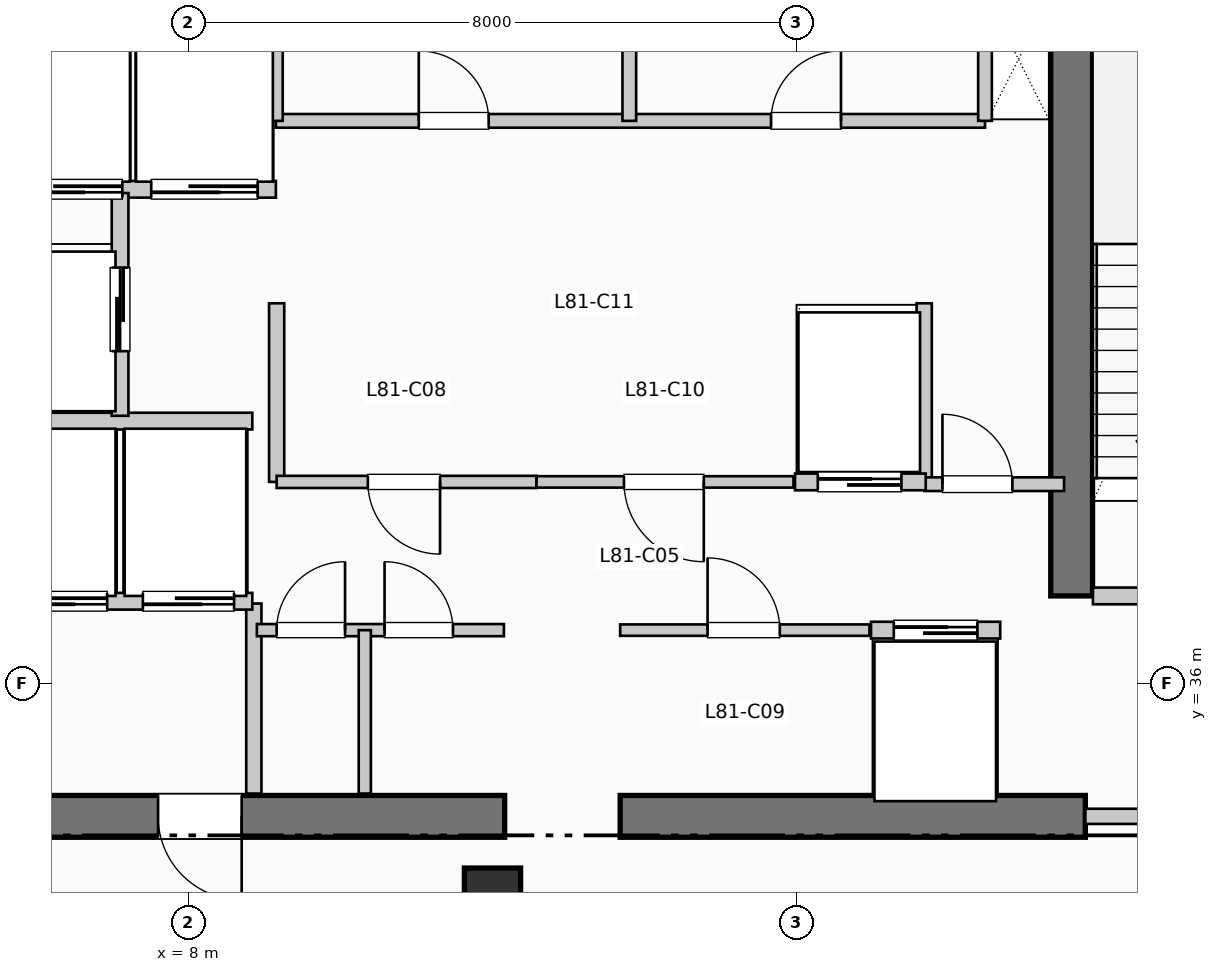
"""IFC4 building model, lengths in metres.
Left out: names, types, materials, properties, quantities, classifications, styles, units other than length and angle.
Written with IfcOpenShell. Run it as: python <this file> out.ifc"""

import sys

from ifc_helpers import new_model, si_unit, direction, frame, frame_2d, origin, origin_2d, place, context, subcontext, project, spatial, rectangle, extrude, element, fill, save


model = new_model("IFC4")
c1 = context("Model", 3, precision=1e-05, world=origin(), true_north=direction((0.0, 1.0)))
c2 = subcontext(c1, "Body", "Model", "MODEL_VIEW")
j1 = project(units=[si_unit("LENGTHUNIT", "METRE"), si_unit("PLANEANGLEUNIT", "RADIAN")], contexts=[c1])
p1 = place(None, origin())
s1 = spatial("IfcSite", under=j1, at=p1, CompositionType="ELEMENT")
p2 = place(p1, origin())
s2 = spatial("IfcBuilding", under=s1, at=p2, CompositionType="ELEMENT")
p3 = place(p2, frame((0.0, 0.0, 331.65)))
s3 = spatial("IfcBuildingStorey", under=s2, at=p3, CompositionType="ELEMENT", Elevation=331.65)
p4 = place(p3, frame((1.45, 34.25, 0.0), z_axis=(0.0, 0.0, 1.0), x_axis=(1.0, 0.0, 0.0)))
e1 = element("IfcWall", 1, at=p4, inside=s3, PredefinedType="SHEAR", context=c2, shape_type="SweptSolid", body=[
    extrude(rectangle(XDim=10.71, YDim=0.55, at=frame_2d((5.355, 0.0))), origin(), (0.0, 0.0, 1.0), 3.96),
])
p5 = place(p4, frame((7.25, 0.0, 0.0), z_axis=(0.0, 0.0, 1.0), x_axis=(-1.0, 0.0, 0.0)))
e2 = element("IfcOpeningElement", 2, at=p5, cuts=e1, PredefinedType="OPENING", context=c2, shape_type="SweptSolid", body=[
    extrude(rectangle(XDim=1.1, YDim=2.15, at=frame_2d((0.55, 1.075))), frame((0.0, 0.285, 0.0), z_axis=(0.0, -1.0, 0.0), x_axis=(1.0, 0.0, 0.0)), (0.0, 0.0, 1.0), 0.57),
])
p6 = place(p3, frame((13.68, 34.25, 0.0), z_axis=(0.0, 0.0, 1.0), x_axis=(1.0, 0.0, 0.0)))
e3 = element("IfcWall", 3, at=p6, inside=s3, PredefinedType="SHEAR", context=c2, shape_type="SweptSolid", body=[
    extrude(rectangle(XDim=6.12, YDim=0.55, at=frame_2d((3.06, 0.0))), origin(), (0.0, 0.0, 1.0), 3.96),
])
p7 = place(p3, frame((19.62, 37.15, 0.0), z_axis=(0.0, 0.0, 1.0), x_axis=(0.0, 1.0, 0.0)))
e4 = element("IfcWall", 4, at=p7, inside=s3, PredefinedType="SHEAR", context=c2, shape_type="SweptSolid", body=[
    extrude(rectangle(XDim=7.89, YDim=0.55, at=frame_2d((3.945, 0.0))), origin(), (0.0, 0.0, 1.0), 3.96),
])
p8 = place(p3, frame((12.0, 33.2, 0.0), z_axis=(0.0, 0.0, 1.0), x_axis=(1.0, 0.0, 0.0)))
e5 = element("IfcColumn", 5, at=p8, inside=s3, PredefinedType="COLUMN", context=c2, shape_type="SweptSolid", body=[
    extrude(rectangle(XDim=0.74, YDim=0.74, at=origin_2d()), origin(), (0.0, 0.0, 1.0), 3.96),
])
p9 = place(p3, frame((8.86, 34.55, 0.0), z_axis=(0.0, 0.0, 1.0), x_axis=(0.0, 1.0, 0.0)))
e6 = element("IfcWall", 6, at=p9, inside=s3, PredefinedType="PARTITIONING", context=c2, shape_type="SweptSolid", body=[
    extrude(rectangle(XDim=2.5, YDim=0.2, at=frame_2d((1.25, 0.0))), origin(), (0.0, 0.0, 1.0), 3.74),
])
p10 = place(p3, frame((19.9, 37.15, 0.0), z_axis=(0.0, 0.0, 1.0), x_axis=(1.0, 0.0, 0.0)))
e7 = element("IfcWall", 7, at=p10, inside=s3, PredefinedType="PARTITIONING", context=c2, shape_type="SweptSolid", body=[
    extrude(rectangle(XDim=3.15, YDim=0.22, at=frame_2d((1.575, 0.0))), origin(), (0.0, 0.0, 1.0), 3.74),
])
p11 = place(p10, frame((2.05, 0.0, 0.0), z_axis=(0.0, 0.0, 1.0), x_axis=(-1.0, 0.0, 0.0)))
e8 = element("IfcOpeningElement", 8, at=p11, cuts=e7, PredefinedType="OPENING", context=c2, shape_type="SweptSolid", body=[
    extrude(rectangle(XDim=1.05, YDim=2.15, at=frame_2d((0.525, 1.075))), frame((0.0, 0.12, 0.0), z_axis=(0.0, -1.0, 0.0), x_axis=(1.0, 0.0, 0.0)), (0.0, 0.0, 1.0), 0.24),
])
p12 = place(p3, frame((19.8, 34.25, 0.0), z_axis=(0.0, 0.0, 1.0), x_axis=(1.0, 0.0, 0.0)))
e9 = element("IfcWall", 9, at=p12, inside=s3, PredefinedType="PARTITIONING", context=c2, shape_type="SweptSolid", body=[
    extrude(rectangle(XDim=3.25, YDim=0.2, at=frame_2d((1.625, 0.0))), origin(), (0.0, 0.0, 1.0), 3.74),
])
p13 = place(p12, frame((2.15, 0.0, 0.0), z_axis=(0.0, 0.0, 1.0), x_axis=(-1.0, 0.0, 0.0)))
e10 = element("IfcOpeningElement", 10, at=p13, cuts=e9, PredefinedType="OPENING", context=c2, shape_type="SweptSolid", body=[
    extrude(rectangle(XDim=1.1, YDim=2.15, at=frame_2d((0.55, 1.075))), frame((0.0, 0.11, 0.0), z_axis=(0.0, -1.0, 0.0), x_axis=(1.0, 0.0, 0.0)), (0.0, 0.0, 1.0), 0.22),
])
p14 = place(p3, frame((5.38, 37.08, 0.0), z_axis=(0.0, 0.0, 1.0), x_axis=(1.0, 0.0, 0.0)))
e11 = element("IfcWall", 11, at=p14, inside=s3, PredefinedType="PARTITIONING", context=c2, shape_type="SweptSolid", body=[
    extrude(rectangle(XDim=3.46, YDim=0.22, at=frame_2d((1.73, 0.0))), origin(), (0.0, 0.0, 1.0), 3.74),
])
p15 = place(p14, frame((1.55, 0.0, 0.0), z_axis=(0.0, 0.0, 1.0), x_axis=(-1.0, 0.0, 0.0)))
e12 = element("IfcOpeningElement", 12, at=p15, cuts=e11, PredefinedType="OPENING", context=c2, shape_type="SweptSolid", body=[
    extrude(rectangle(XDim=1.2, YDim=2.2, at=frame_2d((0.6, 1.1))), frame((0.0, 0.12, 0.0), z_axis=(0.0, -1.0, 0.0), x_axis=(1.0, 0.0, 0.0)), (0.0, 0.0, 1.0), 0.24),
])
p16 = place(p14, frame((3.22, 0.0, 0.0), z_axis=(0.0, 0.0, 1.0), x_axis=(-1.0, 0.0, 0.0)))
e13 = element("IfcOpeningElement", 13, at=p16, cuts=e11, PredefinedType="OPENING", context=c2, shape_type="SweptSolid", body=[
    extrude(rectangle(XDim=1.2, YDim=2.2, at=frame_2d((0.6, 1.1))), frame((0.0, 0.12, 0.0), z_axis=(0.0, -1.0, 0.0), x_axis=(1.0, 0.0, 0.0)), (0.0, 0.0, 1.0), 0.24),
])
p17 = place(p3, frame((5.38, 39.45, 0.0), z_axis=(0.0, 0.0, 1.0), x_axis=(1.0, 0.0, 0.0)))
e14 = element("IfcWall", 14, at=p17, inside=s3, PredefinedType="PARTITIONING", context=c2, shape_type="SweptSolid", body=[
    extrude(rectangle(XDim=3.46, YDim=0.22, at=frame_2d((1.73, 0.0))), origin(), (0.0, 0.0, 1.0), 3.74),
])
p18 = place(p3, frame((5.38, 42.5, 0.0), z_axis=(0.0, 0.0, 1.0), x_axis=(1.0, 0.0, 0.0)))
e15 = element("IfcWall", 15, at=p18, inside=s3, PredefinedType="PARTITIONING", context=c2, shape_type="SweptSolid", body=[
    extrude(rectangle(XDim=3.77, YDim=0.22, at=frame_2d((1.885, 0.0))), origin(), (0.0, 0.0, 1.0), 3.74),
])
p19 = place(p18, frame((1.75, 0.0, 0.0), z_axis=(0.0, 0.0, 1.0), x_axis=(-1.0, 0.0, 0.0)))
e16 = element("IfcOpeningElement", 16, at=p19, cuts=e15, PredefinedType="OPENING", context=c2, shape_type="SweptSolid", body=[
    extrude(rectangle(XDim=1.4, YDim=2.2, at=frame_2d((0.7, 1.1))), frame((0.0, 0.12, 0.0), z_axis=(0.0, -1.0, 0.0), x_axis=(1.0, 0.0, 0.0)), (0.0, 0.0, 1.0), 0.24),
])
p20 = place(p18, frame((3.53, 0.0, 0.0), z_axis=(0.0, 0.0, 1.0), x_axis=(-1.0, 0.0, 0.0)))
e17 = element("IfcOpeningElement", 17, at=p20, cuts=e15, PredefinedType="OPENING", context=c2, shape_type="SweptSolid", body=[
    extrude(rectangle(XDim=1.4, YDim=2.2, at=frame_2d((0.7, 1.1))), frame((0.0, 0.12, 0.0), z_axis=(0.0, -1.0, 0.0), x_axis=(1.0, 0.0, 0.0)), (0.0, 0.0, 1.0), 0.24),
])
p21 = place(p3, frame((7.1, 39.52, 0.0), z_axis=(0.0, 0.0, 1.0), x_axis=(0.0, 1.0, 0.0)))
e18 = element("IfcWall", 18, at=p21, inside=s3, PredefinedType="PARTITIONING", context=c2, shape_type="SweptSolid", body=[
    extrude(rectangle(XDim=2.93, YDim=0.22, at=frame_2d((1.465, 0.0))), origin(), (0.0, 0.0, 1.0), 3.74),
])
p22 = place(p21, frame((0.85, 0.0, 0.0)))
e19 = element("IfcOpeningElement", 19, at=p22, cuts=e18, PredefinedType="OPENING", context=c2, shape_type="SweptSolid", body=[
    extrude(rectangle(XDim=1.1, YDim=2.2, at=frame_2d((0.55, 1.1))), frame((0.0, 0.12, 0.0), z_axis=(0.0, -1.0, 0.0), x_axis=(1.0, 0.0, 0.0)), (0.0, 0.0, 1.0), 0.24),
])
for number, where, z_axis, x_axis in (
    (20, (9.16, 38.65, 0.0), (0.0, 0.0, 1.0), (0.0, 1.0, 0.0)),
    (21, (17.68, 38.65, 0.0), (0.0, 0.0, 1.0), (0.0, 1.0, 0.0)),
):
    element("IfcWall", number, at=place(p3, frame(where, z_axis=z_axis, x_axis=x_axis)), inside=s3, PredefinedType="PARTITIONING", context=c2, shape_type="SweptSolid", body=[
        extrude(rectangle(XDim=2.35, YDim=0.2, at=frame_2d((1.175, 0.0))), origin(), (0.0, 0.0, 1.0), 3.74),
    ])
p23 = place(p3, frame((17.68, 38.62, 0.0), z_axis=(0.0, 0.0, 1.0), x_axis=(1.0, 0.0, 0.0)))
e22 = element("IfcWall", 22, at=p23, inside=s3, PredefinedType="PARTITIONING", context=c2, shape_type="SweptSolid", body=[
    extrude(rectangle(XDim=1.84, YDim=0.18, at=frame_2d((0.92, 0.0))), origin(), (0.0, 0.0, 1.0), 3.74),
])
p24 = place(p23, frame((0.24, 0.0, 0.0)))
e23 = element("IfcOpeningElement", 23, at=p24, cuts=e22, PredefinedType="OPENING", context=c2, shape_type="SweptSolid", body=[
    extrude(rectangle(XDim=0.92, YDim=2.1, at=frame_2d((0.46, 1.05))), frame((0.0, 0.1, 0.0), z_axis=(0.0, -1.0, 0.0), x_axis=(1.0, 0.0, 0.0)), (0.0, 0.0, 1.0), 0.2),
])
p25 = place(p3, frame((8.9, 36.7, 0.0), z_axis=(0.0, 0.0, 1.0), x_axis=(1.0, 0.0, 0.0)))
e24 = element("IfcWall", 24, at=p25, inside=s3, PredefinedType="PARTITIONING", context=c2, shape_type="SweptSolid", body=[
    extrude(rectangle(XDim=3.25, YDim=0.16, at=frame_2d((1.625, 0.0))), origin(), (0.0, 0.0, 1.0), 3.74),
])
p26 = place(p25, frame((0.26, 0.0, 0.0)))
e25 = element("IfcOpeningElement", 25, at=p26, cuts=e24, PredefinedType="OPENING", context=c2, shape_type="SweptSolid", body=[
    extrude(rectangle(XDim=0.9, YDim=2.15, at=frame_2d((0.45, 1.075))), frame((0.0, 0.09, 0.0), z_axis=(0.0, -1.0, 0.0), x_axis=(1.0, 0.0, 0.0)), (0.0, 0.0, 1.0), 0.18),
])
p27 = place(p25, frame((1.68, 0.0, 0.0)))
e26 = element("IfcOpeningElement", 26, at=p27, cuts=e24, PredefinedType="OPENING", context=c2, shape_type="SweptSolid", body=[
    extrude(rectangle(XDim=0.9, YDim=2.15, at=frame_2d((0.45, 1.075))), frame((0.0, 0.09, 0.0), z_axis=(0.0, -1.0, 0.0), x_axis=(1.0, 0.0, 0.0)), (0.0, 0.0, 1.0), 0.18),
])
p28 = place(p3, frame((10.32, 34.55, 0.0), z_axis=(0.0, 0.0, 1.0), x_axis=(0.0, 1.0, 0.0)))
e27 = element("IfcWall", 27, at=p28, inside=s3, PredefinedType="PARTITIONING", context=c2, shape_type="SweptSolid", body=[
    extrude(rectangle(XDim=2.15, YDim=0.16, at=frame_2d((1.075, 0.0))), origin(), (0.0, 0.0, 1.0), 3.74),
])
p29 = place(p3, frame((9.16, 38.65, 0.0), z_axis=(0.0, 0.0, 1.0), x_axis=(1.0, 0.0, 0.0)))
e28 = element("IfcWall", 28, at=p29, inside=s3, PredefinedType="PARTITIONING", context=c2, shape_type="SweptSolid", body=[
    extrude(rectangle(XDim=3.42, YDim=0.16, at=frame_2d((1.71, 0.0))), origin(), (0.0, 0.0, 1.0), 3.74),
])
p30 = place(p29, frame((2.15, 0.0, 0.0), z_axis=(0.0, 0.0, 1.0), x_axis=(-1.0, 0.0, 0.0)))
e29 = element("IfcOpeningElement", 29, at=p30, cuts=e28, PredefinedType="OPENING", context=c2, shape_type="SweptSolid", body=[
    extrude(rectangle(XDim=0.95, YDim=2.15, at=frame_2d((0.475, 1.075))), frame((0.0, 0.09, 0.0), z_axis=(0.0, -1.0, 0.0), x_axis=(1.0, 0.0, 0.0)), (0.0, 0.0, 1.0), 0.18),
])
p31 = place(p3, frame((13.68, 36.7, 0.0), z_axis=(0.0, 0.0, 1.0), x_axis=(1.0, 0.0, 0.0)))
e30 = element("IfcWall", 30, at=p31, inside=s3, PredefinedType="PARTITIONING", context=c2, shape_type="SweptSolid", body=[
    extrude(rectangle(XDim=3.28, YDim=0.15, at=frame_2d((1.64, 0.0))), origin(), (0.0, 0.0, 1.0), 3.74),
])
p32 = place(p31, frame((1.15, 0.0, 0.0)))
e31 = element("IfcOpeningElement", 31, at=p32, cuts=e30, PredefinedType="OPENING", context=c2, shape_type="SweptSolid", body=[
    extrude(rectangle(XDim=0.95, YDim=2.15, at=frame_2d((0.475, 1.075))), frame((0.0, 0.085, 0.0), z_axis=(0.0, -1.0, 0.0), x_axis=(1.0, 0.0, 0.0)), (0.0, 0.0, 1.0), 0.17),
])
p33 = place(p3, frame((12.58, 38.65, 0.0), z_axis=(0.0, 0.0, 1.0), x_axis=(1.0, 0.0, 0.0)))
e32 = element("IfcWall", 32, at=p33, inside=s3, PredefinedType="PARTITIONING", context=c2, shape_type="SweptSolid", body=[
    extrude(rectangle(XDim=3.38, YDim=0.15, at=frame_2d((1.69, 0.0))), origin(), (0.0, 0.0, 1.0), 3.74),
])
p34 = place(p33, frame((2.2, 0.0, 0.0), z_axis=(0.0, 0.0, 1.0), x_axis=(-1.0, 0.0, 0.0)))
e33 = element("IfcOpeningElement", 33, at=p34, cuts=e32, PredefinedType="OPENING", context=c2, shape_type="SweptSolid", body=[
    extrude(rectangle(XDim=1.05, YDim=2.15, at=frame_2d((0.525, 1.075))), frame((0.0, 0.085, 0.0), z_axis=(0.0, -1.0, 0.0), x_axis=(1.0, 0.0, 0.0)), (0.0, 0.0, 1.0), 0.17),
])
p35 = place(p3, frame((16.98, 36.7, 0.0), z_axis=(0.0, 0.0, 1.0), x_axis=(1.0, 0.0, 0.0)))
e34 = element("IfcWall", 34, at=p35, inside=s3, PredefinedType="PARTITIONING", context=c2, shape_type="SweptSolid", body=[
    extrude(rectangle(XDim=1.7, YDim=0.22, at=frame_2d((0.85, 0.0))), origin(), (0.0, 0.0, 1.0), 3.74),
])
p36 = place(p35, frame((0.3, 0.0, 0.0)))
e35 = element("IfcOpeningElement", 35, at=p36, cuts=e34, PredefinedType="OPENING", context=c2, shape_type="SweptSolid", body=[
    extrude(rectangle(XDim=1.1, YDim=2.2, at=frame_2d((0.55, 1.1))), frame((0.0, 0.12, 0.0), z_axis=(0.0, -1.0, 0.0), x_axis=(1.0, 0.0, 0.0)), (0.0, 0.0, 1.0), 0.24),
])
p37 = place(p3, frame((15.98, 38.65, 0.0), z_axis=(0.0, 0.0, 1.0), x_axis=(1.0, 0.0, 0.0)))
e36 = element("IfcWall", 36, at=p37, inside=s3, PredefinedType="PARTITIONING", context=c2, shape_type="SweptSolid", body=[
    extrude(rectangle(XDim=1.72, YDim=0.22, at=frame_2d((0.86, 0.0))), origin(), (0.0, 0.0, 1.0), 3.74),
])
p38 = place(p37, frame((0.3, 0.0, 0.0)))
e37 = element("IfcOpeningElement", 37, at=p38, cuts=e36, PredefinedType="OPENING", context=c2, shape_type="SweptSolid", body=[
    extrude(rectangle(XDim=1.1, YDim=2.2, at=frame_2d((0.55, 1.1))), frame((0.0, 0.12, 0.0), z_axis=(0.0, -1.0, 0.0), x_axis=(1.0, 0.0, 0.0)), (0.0, 0.0, 1.0), 0.24),
])
p39 = place(p3, frame((9.15, 43.4, 0.0), z_axis=(0.0, 0.0, 1.0), x_axis=(1.0, 0.0, 0.0)))
e38 = element("IfcWall", 38, at=p39, inside=s3, PredefinedType="PLUMBINGWALL", context=c2, shape_type="SweptSolid", body=[
    extrude(rectangle(XDim=9.33, YDim=0.18, at=frame_2d((4.665, 0.0))), origin(), (0.0, 0.0, 1.0), 3.74),
])
p40 = place(p39, frame((1.88, 0.0, 0.0)))
e39 = element("IfcOpeningElement", 39, at=p40, cuts=e38, PredefinedType="OPENING", context=c2, shape_type="SweptSolid", body=[
    extrude(rectangle(XDim=0.92, YDim=2.1, at=frame_2d((0.46, 1.05))), frame((0.0, 0.1, 0.0), z_axis=(0.0, -1.0, 0.0), x_axis=(1.0, 0.0, 0.0)), (0.0, 0.0, 1.0), 0.2),
])
p41 = place(p39, frame((6.515, 0.0, 0.0)))
e40 = element("IfcOpeningElement", 40, at=p41, cuts=e38, PredefinedType="OPENING", context=c2, shape_type="SweptSolid", body=[
    extrude(rectangle(XDim=0.92, YDim=2.1, at=frame_2d((0.46, 1.05))), frame((0.0, 0.1, 0.0), z_axis=(0.0, -1.0, 0.0), x_axis=(1.0, 0.0, 0.0)), (0.0, 0.0, 1.0), 0.2),
])
for number, where, z_axis, x_axis in (
    (41, (9.15, 43.4, 0.0), (0.0, 0.0, 1.0), (0.0, 1.0, 0.0)),
    (42, (18.48, 43.4, 0.0), (0.0, 0.0, 1.0), (0.0, 1.0, 0.0)),
    (43, (13.8, 43.4, 0.0), (0.0, 0.0, 1.0), (0.0, 1.0, 0.0)),
):
    element("IfcWall", number, at=place(p3, frame(where, z_axis=z_axis, x_axis=x_axis)), inside=s3, PredefinedType="PLUMBINGWALL", context=c2, shape_type="SweptSolid", body=[
        extrude(rectangle(XDim=1.88, YDim=0.18, at=frame_2d((0.94, 0.0))), origin(), (0.0, 0.0, 1.0), 3.74),
    ])
p42 = place(p5, origin())
e44 = element("IfcDoor", 44, at=p42, inside=s3, OperationType="SINGLE_SWING_RIGHT", PredefinedType="DOOR", context=c2, shape_type="SweptSolid", body=[
    extrude(rectangle(XDim=1.1, YDim=2.15, at=frame_2d((0.55, 1.075))), frame((0.0, 0.025, 0.0), z_axis=(0.0, -1.0, 0.0), x_axis=(1.0, 0.0, 0.0)), (0.0, 0.0, 1.0), 0.05),
])
fill(e2, e44)
p43 = place(p15, origin())
e45 = element("IfcDoor", 45, at=p43, inside=s3, OperationType="SLIDING_TO_RIGHT", PredefinedType="DOOR", context=c2, shape_type="SweptSolid", body=[
    extrude(rectangle(XDim=1.2, YDim=2.2, at=frame_2d((0.6, 1.1))), frame((0.0, 0.025, 0.0), z_axis=(0.0, -1.0, 0.0), x_axis=(1.0, 0.0, 0.0)), (0.0, 0.0, 1.0), 0.05),
])
fill(e12, e45)
p44 = place(p16, origin())
e46 = element("IfcDoor", 46, at=p44, inside=s3, OperationType="SLIDING_TO_RIGHT", PredefinedType="DOOR", context=c2, shape_type="SweptSolid", body=[
    extrude(rectangle(XDim=1.2, YDim=2.2, at=frame_2d((0.6, 1.1))), frame((0.0, 0.025, 0.0), z_axis=(0.0, -1.0, 0.0), x_axis=(1.0, 0.0, 0.0)), (0.0, 0.0, 1.0), 0.05),
])
fill(e13, e46)
p45 = place(p19, origin())
e47 = element("IfcDoor", 47, at=p45, inside=s3, OperationType="SLIDING_TO_LEFT", PredefinedType="DOOR", context=c2, shape_type="SweptSolid", body=[
    extrude(rectangle(XDim=1.4, YDim=2.2, at=frame_2d((0.7, 1.1))), frame((0.0, 0.025, 0.0), z_axis=(0.0, -1.0, 0.0), x_axis=(1.0, 0.0, 0.0)), (0.0, 0.0, 1.0), 0.05),
])
fill(e16, e47)
p46 = place(p20, origin())
e48 = element("IfcDoor", 48, at=p46, inside=s3, OperationType="SLIDING_TO_LEFT", PredefinedType="DOOR", context=c2, shape_type="SweptSolid", body=[
    extrude(rectangle(XDim=1.4, YDim=2.2, at=frame_2d((0.7, 1.1))), frame((0.0, 0.025, 0.0), z_axis=(0.0, -1.0, 0.0), x_axis=(1.0, 0.0, 0.0)), (0.0, 0.0, 1.0), 0.05),
])
fill(e17, e48)
p47 = place(p22, origin())
e49 = element("IfcDoor", 49, at=p47, inside=s3, OperationType="SLIDING_TO_LEFT", PredefinedType="DOOR", context=c2, shape_type="SweptSolid", body=[
    extrude(rectangle(XDim=1.1, YDim=2.2, at=frame_2d((0.55, 1.1))), frame((0.0, 0.025, 0.0), z_axis=(0.0, -1.0, 0.0), x_axis=(1.0, 0.0, 0.0)), (0.0, 0.0, 1.0), 0.05),
])
fill(e19, e49)
p48 = place(p24, origin())
e50 = element("IfcDoor", 50, at=p48, inside=s3, OperationType="SINGLE_SWING_LEFT", PredefinedType="DOOR", context=c2, shape_type="SweptSolid", body=[
    extrude(rectangle(XDim=0.92, YDim=2.1, at=frame_2d((0.46, 1.05))), frame((0.0, 0.025, 0.0), z_axis=(0.0, -1.0, 0.0), x_axis=(1.0, 0.0, 0.0)), (0.0, 0.0, 1.0), 0.05),
])
fill(e23, e50)
p49 = place(p26, origin())
e51 = element("IfcDoor", 51, at=p49, inside=s3, OperationType="SINGLE_SWING_RIGHT", PredefinedType="DOOR", context=c2, shape_type="SweptSolid", body=[
    extrude(rectangle(XDim=0.9, YDim=2.15, at=frame_2d((0.45, 1.075))), frame((0.0, 0.025, 0.0), z_axis=(0.0, -1.0, 0.0), x_axis=(1.0, 0.0, 0.0)), (0.0, 0.0, 1.0), 0.05),
])
fill(e25, e51)
p50 = place(p27, origin())
e52 = element("IfcDoor", 52, at=p50, inside=s3, OperationType="SINGLE_SWING_LEFT", PredefinedType="DOOR", context=c2, shape_type="SweptSolid", body=[
    extrude(rectangle(XDim=0.9, YDim=2.15, at=frame_2d((0.45, 1.075))), frame((0.0, 0.025, 0.0), z_axis=(0.0, -1.0, 0.0), x_axis=(1.0, 0.0, 0.0)), (0.0, 0.0, 1.0), 0.05),
])
fill(e26, e52)
p51 = place(p30, origin())
e53 = element("IfcDoor", 53, at=p51, inside=s3, OperationType="SINGLE_SWING_RIGHT", PredefinedType="DOOR", context=c2, shape_type="SweptSolid", body=[
    extrude(rectangle(XDim=0.95, YDim=2.15, at=frame_2d((0.475, 1.075))), frame((0.0, 0.025, 0.0), z_axis=(0.0, -1.0, 0.0), x_axis=(1.0, 0.0, 0.0)), (0.0, 0.0, 1.0), 0.05),
])
fill(e29, e53)
p52 = place(p32, origin())
e54 = element("IfcDoor", 54, at=p52, inside=s3, OperationType="SINGLE_SWING_LEFT", PredefinedType="DOOR", context=c2, shape_type="SweptSolid", body=[
    extrude(rectangle(XDim=0.95, YDim=2.15, at=frame_2d((0.475, 1.075))), frame((0.0, 0.025, 0.0), z_axis=(0.0, -1.0, 0.0), x_axis=(1.0, 0.0, 0.0)), (0.0, 0.0, 1.0), 0.05),
])
fill(e31, e54)
p53 = place(p34, origin())
e55 = element("IfcDoor", 55, at=p53, inside=s3, OperationType="SINGLE_SWING_RIGHT", PredefinedType="DOOR", context=c2, shape_type="SweptSolid", body=[
    extrude(rectangle(XDim=1.05, YDim=2.15, at=frame_2d((0.525, 1.075))), frame((0.0, 0.025, 0.0), z_axis=(0.0, -1.0, 0.0), x_axis=(1.0, 0.0, 0.0)), (0.0, 0.0, 1.0), 0.05),
])
fill(e33, e55)
p54 = place(p36, origin())
e56 = element("IfcDoor", 56, at=p54, inside=s3, OperationType="SLIDING_TO_LEFT", PredefinedType="DOOR", context=c2, shape_type="SweptSolid", body=[
    extrude(rectangle(XDim=1.1, YDim=2.2, at=frame_2d((0.55, 1.1))), frame((0.0, 0.025, 0.0), z_axis=(0.0, -1.0, 0.0), x_axis=(1.0, 0.0, 0.0)), (0.0, 0.0, 1.0), 0.05),
])
fill(e35, e56)
p55 = place(p38, origin())
e57 = element("IfcDoor", 57, at=p55, inside=s3, OperationType="SLIDING_TO_LEFT", PredefinedType="DOOR", context=c2, shape_type="SweptSolid", body=[
    extrude(rectangle(XDim=1.1, YDim=2.2, at=frame_2d((0.55, 1.1))), frame((0.0, 0.025, 0.0), z_axis=(0.0, -1.0, 0.0), x_axis=(1.0, 0.0, 0.0)), (0.0, 0.0, 1.0), 0.05),
])
fill(e37, e57)
p56 = place(p40, origin())
e58 = element("IfcDoor", 58, at=p56, inside=s3, OperationType="SINGLE_SWING_LEFT", PredefinedType="DOOR", context=c2, shape_type="SweptSolid", body=[
    extrude(rectangle(XDim=0.92, YDim=2.1, at=frame_2d((0.46, 1.05))), frame((0.0, 0.025, 0.0), z_axis=(0.0, -1.0, 0.0), x_axis=(1.0, 0.0, 0.0)), (0.0, 0.0, 1.0), 0.05),
])
fill(e39, e58)
p57 = place(p41, origin())
e59 = element("IfcDoor", 59, at=p57, inside=s3, OperationType="SINGLE_SWING_RIGHT", PredefinedType="DOOR", context=c2, shape_type="SweptSolid", body=[
    extrude(rectangle(XDim=0.92, YDim=2.1, at=frame_2d((0.46, 1.05))), frame((0.0, 0.025, 0.0), z_axis=(0.0, -1.0, 0.0), x_axis=(1.0, 0.0, 0.0)), (0.0, 0.0, 1.0), 0.05),
])
fill(e40, e59)
save(model, sys.argv[1])
